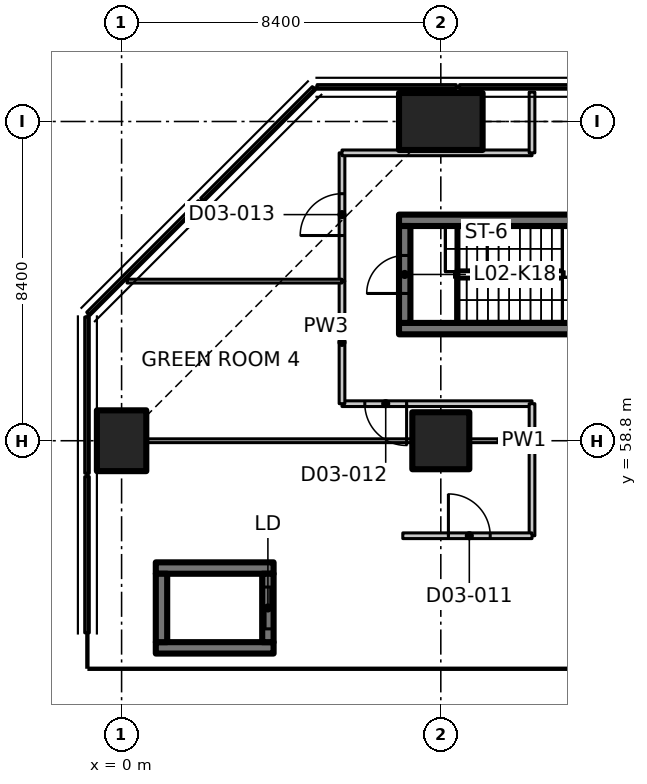
"""IFC4 building model, lengths in metres.
Left out: names, types, materials, properties, quantities, classifications, styles, units other than length and angle.
Written with IfcOpenShell. Run it as: python <this file> out.ifc"""

import sys

from ifc_helpers import new_model, si_unit, direction, frame, frame_2d, origin, origin_2d, place, context, subcontext, project, spatial, polyline, rectangle, outline, extrude, element, fill, save


model = new_model("IFC4")
c1 = context("Model", 3, precision=1e-05, world=origin(), true_north=direction((0.0, 1.0)))
c2 = subcontext(c1, "Body", "Model", "MODEL_VIEW")
j1 = project(units=[si_unit("LENGTHUNIT", "METRE"), si_unit("PLANEANGLEUNIT", "RADIAN")], contexts=[c1])
p1 = place(None, origin())
s1 = spatial("IfcSite", under=j1, at=p1, CompositionType="ELEMENT")
p2 = place(p1, origin())
s2 = spatial("IfcBuilding", under=s1, at=p2, CompositionType="ELEMENT")
p3 = place(p2, frame((0.0, 0.0, 12.5)))
s3 = spatial("IfcBuildingStorey", under=s2, at=p3, CompositionType="ELEMENT", Elevation=12.5)
p4 = place(p3, frame((0.0, 58.8, 0.0), z_axis=(0.0, 0.0, 1.0), x_axis=(1.0, 0.0, 0.0)))
e1 = element("IfcColumn", 1, at=p4, inside=s3, PredefinedType="COLUMN", context=c2, shape_type="SweptSolid", body=[
    extrude(rectangle(XDim=1.3, YDim=1.6, at=origin_2d()), origin(), (0.0, 0.0, 1.0), 7.25),
])
p5 = place(p3, frame((8.4, 58.8, 0.0), z_axis=(0.0, 0.0, 1.0), x_axis=(1.0, 0.0, 0.0)))
e2 = element("IfcColumn", 2, at=p5, inside=s3, PredefinedType="COLUMN", context=c2, shape_type="SweptSolid", body=[
    extrude(rectangle(XDim=1.5, YDim=1.5, at=origin_2d()), origin(), (0.0, 0.0, 1.0), 7.25),
])
p6 = place(p3, frame((8.4, 67.2, 0.0), z_axis=(0.0, 0.0, 1.0), x_axis=(0.0, 1.0, 0.0)))
e3 = element("IfcColumn", 3, at=p6, inside=s3, PredefinedType="COLUMN", context=c2, shape_type="SweptSolid", body=[
    extrude(rectangle(XDim=1.5, YDim=2.2, at=origin_2d()), origin(), (0.0, 0.0, 1.0), 7.25),
])
p7 = place(p2, origin())
s4 = spatial("IfcBuildingStorey", under=s2, at=p7, CompositionType="ELEMENT", Elevation=0.0)
for number, where, z_axis, x_axis in (
    (4, (0.6, 51.6, -6.3), (0.0, 0.0, 1.0), (1.0, 0.0, 0.0)),
    (5, (9.0, 51.6, -6.3), (0.0, 0.0, 1.0), (1.0, 0.0, 0.0)),
):
    element("IfcWall", number, at=place(p7, frame(where, z_axis=z_axis, x_axis=x_axis)), inside=s4, PredefinedType="SOLIDWALL", context=c2, shape_type="SweptSolid", body=[
        extrude(rectangle(XDim=7.2, YDim=2.4, at=frame_2d((3.6, 0.0))), origin(), (0.0, 0.0, 1.0), 42.55),
    ])
p8 = place(p7, frame((-1.2, 52.8, 0.0), z_axis=(0.0, 0.0, 1.0), x_axis=(0.0, 1.0, 0.0)))
e6 = element("IfcWall", 6, at=p8, inside=s4, PredefinedType="SOLIDWALL", context=c2, shape_type="SweptSolid", body=[
    extrude(rectangle(XDim=0.9, YDim=0.6, at=frame_2d((0.45, 0.0))), origin(), (0.0, 0.0, 1.0), 36.23),
])
p9 = place(p3, origin())
e7 = element("IfcWall", 7, at=p9, inside=s3, PredefinedType="SOLIDWALL", context=c2, shape_type="SweptSolid", body=[
    extrude(outline(polyline([(8.895, 68.17), (8.895, 68.05), (12.555, 68.05), (12.555, 68.17), (8.895, 68.17)])), origin(), (0.0, 0.0, 1.0), 7.5),
])
p10 = place(p3, origin())
e8 = element("IfcWall", 8, at=p10, inside=s3, PredefinedType="SOLIDWALL", context=c2, shape_type="SweptSolid", body=[
    extrude(outline(polyline([(5.145, 68.17), (5.145, 68.05), (8.805, 68.05), (8.805, 68.17), (5.145, 68.17)])), origin(), (0.0, 0.0, 1.0), 7.5),
])
p11 = place(p3, origin())
e9 = element("IfcWall", 9, at=p11, inside=s3, PredefinedType="SOLIDWALL", context=c2, shape_type="SweptSolid", body=[
    extrude(outline(polyline([(5.104, 68.033), (2.167, 65.096), (2.082, 65.181), (5.019, 68.118), (5.104, 68.033)])), origin(), (0.0, 0.0, 1.0), 7.5),
])
p12 = place(p3, origin())
e10 = element("IfcWall", 10, at=p12, inside=s3, PredefinedType="SOLIDWALL", context=c2, shape_type="SweptSolid", body=[
    extrude(outline(polyline([(2.104, 65.033), (-0.833, 62.096), (-0.918, 62.181), (2.019, 65.118), (2.104, 65.033)])), origin(), (0.0, 0.0, 1.0), 7.5),
])
p13 = place(p3, origin())
e11 = element("IfcWall", 11, at=p13, inside=s3, PredefinedType="SOLIDWALL", context=c2, shape_type="SweptSolid", body=[
    extrude(outline(polyline([(-0.97, 57.945), (-0.85, 57.945), (-0.85, 62.055), (-0.97, 62.055), (-0.97, 57.945)])), origin(), (0.0, 0.0, 1.0), 7.5),
])
p14 = place(p3, origin())
e12 = element("IfcWall", 12, at=p14, inside=s3, PredefinedType="SOLIDWALL", context=c2, shape_type="SweptSolid", body=[
    extrude(outline(polyline([(-0.97, 53.745), (-0.85, 53.745), (-0.85, 57.855), (-0.97, 57.855), (-0.97, 53.745)])), origin(), (0.0, 0.0, 1.0), 7.5),
])
for number, where, z_axis, x_axis in (
    (13, (0.9, 53.35, 0.0), (0.0, 0.0, 1.0), (1.0, 0.0, 0.0)),
    (14, (0.9, 55.45, 0.0), (0.0, 0.0, 1.0), (1.0, 0.0, 0.0)),
):
    element("IfcWall", number, at=place(p3, frame(where, z_axis=z_axis, x_axis=x_axis)), inside=s3, PredefinedType="SHEAR", context=c2, shape_type="SweptSolid", body=[
        extrude(rectangle(XDim=3.1, YDim=0.3, at=frame_2d((1.55, 0.0))), origin(), (0.0, 0.0, 1.0), 7.25),
    ])
p15 = place(p3, frame((1.05, 53.5, 0.0), z_axis=(0.0, 0.0, 1.0), x_axis=(0.0, 1.0, 0.0)))
e15 = element("IfcWall", 15, at=p15, inside=s3, PredefinedType="SHEAR", context=c2, shape_type="SweptSolid", body=[
    extrude(rectangle(XDim=1.8, YDim=0.3, at=frame_2d((0.9, 0.0))), origin(), (0.0, 0.0, 1.0), 7.25),
])
p16 = place(p3, frame((3.85, 53.5, 0.0), z_axis=(0.0, 0.0, 1.0), x_axis=(0.0, 1.0, 0.0)))
e16 = element("IfcWall", 16, at=p16, inside=s3, PredefinedType="SHEAR", context=c2, shape_type="SweptSolid", body=[
    extrude(rectangle(XDim=1.8, YDim=0.3, at=frame_2d((0.9, 0.0))), origin(), (0.0, 0.0, 1.0), 7.25),
])
p17 = place(p16, frame((0.35, 0.0, 0.0)))
e17 = element("IfcOpeningElement", 17, at=p17, cuts=e16, PredefinedType="OPENING", context=c2, shape_type="SweptSolid", body=[
    extrude(rectangle(XDim=1.1, YDim=2.3, at=frame_2d((0.55, 1.15))), frame((0.0, 0.16, 0.0), z_axis=(0.0, -1.0, 0.0), x_axis=(1.0, 0.0, 0.0)), (0.0, 0.0, 1.0), 0.32),
])
for number, where, z_axis, x_axis in (
    (18, (7.3, 61.75, 0.0), (0.0, 0.0, 1.0), (1.0, 0.0, 0.0)),
    (19, (7.3, 64.6, 0.0), (0.0, 0.0, 1.0), (1.0, 0.0, 0.0)),
):
    element("IfcWall", number, at=place(p3, frame(where, z_axis=z_axis, x_axis=x_axis)), inside=s3, PredefinedType="SHEAR", context=c2, shape_type="SweptSolid", body=[
        extrude(rectangle(XDim=8.2, YDim=0.3, at=frame_2d((4.1, 0.0))), origin(), (0.0, 0.0, 1.0), 7.25),
    ])
p18 = place(p3, frame((7.45, 61.9, 0.0), z_axis=(0.0, 0.0, 1.0), x_axis=(0.0, 1.0, 0.0)))
e20 = element("IfcWall", 20, at=p18, inside=s3, PredefinedType="SHEAR", context=c2, shape_type="SweptSolid", body=[
    extrude(rectangle(XDim=2.55, YDim=0.3, at=frame_2d((1.275, 0.0))), origin(), (0.0, 0.0, 1.0), 7.25),
])
p19 = place(p18, frame((0.775, 0.0, 0.0)))
e21 = element("IfcOpeningElement", 21, at=p19, cuts=e20, PredefinedType="OPENING", context=c2, shape_type="SweptSolid", body=[
    extrude(rectangle(XDim=1.0, YDim=2.1, at=frame_2d((0.5, 1.05))), frame((0.0, 0.16, 0.0), z_axis=(0.0, -1.0, 0.0), x_axis=(1.0, 0.0, 0.0)), (0.0, 0.0, 1.0), 0.32),
])
p20 = place(p3, frame((10.8, 56.3, 0.0), z_axis=(0.0, 0.0, 1.0), x_axis=(0.0, 1.0, 0.0)))
e22 = element("IfcWall", 22, at=p20, inside=s3, PredefinedType="PARTITIONING", context=c2, shape_type="SweptSolid", body=[
    extrude(rectangle(XDim=2.5, YDim=0.15, at=frame_2d((1.25, 0.0))), origin(), (0.0, 0.0, 1.0), 7.23),
])
p21 = place(p3, frame((10.8, 59.775, 0.0), z_axis=(0.0, 0.0, 1.0), x_axis=(-1.0, 0.0, 0.0)))
e23 = element("IfcWall", 23, at=p21, inside=s3, PredefinedType="PARTITIONING", context=c2, shape_type="SweptSolid", body=[
    extrude(rectangle(XDim=5.0, YDim=0.15, at=frame_2d((2.5, 0.0))), origin(), (0.0, 0.0, 1.0), 7.23),
])
p22 = place(p21, frame((3.3, 0.0, 0.0)))
e24 = element("IfcOpeningElement", 24, at=p22, cuts=e23, PredefinedType="OPENING", context=c2, shape_type="SweptSolid", body=[
    extrude(rectangle(XDim=1.1, YDim=2.1, at=frame_2d((0.55, 1.05))), frame((0.0, 0.085, 0.0), z_axis=(0.0, -1.0, 0.0), x_axis=(1.0, 0.0, 0.0)), (0.0, 0.0, 1.0), 0.17),
])
p23 = place(p3, frame((5.8, 59.775, 0.0), z_axis=(0.0, 0.0, 1.0), x_axis=(0.0, 1.0, 0.0)))
e25 = element("IfcWall", 25, at=p23, inside=s3, PredefinedType="PARTITIONING", context=c2, shape_type="SweptSolid", body=[
    extrude(rectangle(XDim=3.225, YDim=0.15, at=frame_2d((1.613, 0.0))), origin(), (0.0, 0.0, 1.0), 7.23),
])
p24 = place(p3, frame((5.8, 63.0, 0.0), z_axis=(0.0, 0.0, 1.0), x_axis=(0.0, 1.0, 0.0)))
e26 = element("IfcWall", 26, at=p24, inside=s3, PredefinedType="PARTITIONING", context=c2, shape_type="SweptSolid", body=[
    extrude(rectangle(XDim=3.375, YDim=0.15, at=frame_2d((1.688, 0.0))), origin(), (0.0, 0.0, 1.0), 6.88),
])
p25 = place(p24, frame((1.2, 0.0, 0.0)))
e27 = element("IfcOpeningElement", 27, at=p25, cuts=e26, PredefinedType="OPENING", context=c2, shape_type="SweptSolid", body=[
    extrude(rectangle(XDim=1.1, YDim=2.1, at=frame_2d((0.55, 1.05))), frame((0.0, 0.085, 0.0), z_axis=(0.0, -1.0, 0.0), x_axis=(1.0, 0.0, 0.0)), (0.0, 0.0, 1.0), 0.17),
])
p26 = place(p3, frame((5.8, 66.375, 0.0), z_axis=(0.0, 0.0, 1.0), x_axis=(1.0, 0.0, 0.0)))
e28 = element("IfcWall", 28, at=p26, inside=s3, PredefinedType="PARTITIONING", context=c2, shape_type="SweptSolid", body=[
    extrude(outline(polyline([(0.0, 0.0), (5.0, 0.0), (5.0, 7.23), (2.466, 7.23), (2.464, 6.88), (1.086, 6.88), (1.084, 7.23), (0.0, 7.23), (0.0, 0.0)])), frame((0.0, 0.075, 0.0), z_axis=(0.0, -1.0, 0.0), x_axis=(1.0, 0.0, 0.0)), (0.0, 0.0, 1.0), 0.15),
])
p27 = place(p3, frame((7.4, 56.3, 0.0), z_axis=(0.0, 0.0, 1.0), x_axis=(1.0, 0.0, 0.0)))
e29 = element("IfcWall", 29, at=p27, inside=s3, PredefinedType="PARTITIONING", context=c2, shape_type="SweptSolid", body=[
    extrude(rectangle(XDim=3.4, YDim=0.15, at=frame_2d((1.7, 0.0))), origin(), (0.0, 0.0, 1.0), 7.23),
])
p28 = place(p27, frame((1.2, 0.0, 0.0)))
e30 = element("IfcOpeningElement", 30, at=p28, cuts=e29, PredefinedType="OPENING", context=c2, shape_type="SweptSolid", body=[
    extrude(rectangle(XDim=1.1, YDim=2.1, at=frame_2d((0.55, 1.05))), frame((0.0, 0.085, 0.0), z_axis=(0.0, -1.0, 0.0), x_axis=(1.0, 0.0, 0.0)), (0.0, 0.0, 1.0), 0.17),
])
p29 = place(p3, frame((10.8, 66.375, 0.0), z_axis=(0.0, 0.0, 1.0), x_axis=(0.0, 1.0, 0.0)))
e31 = element("IfcWall", 31, at=p29, inside=s3, PredefinedType="PARTITIONING", context=c2, shape_type="SweptSolid", body=[
    extrude(rectangle(XDim=1.598, YDim=0.15, at=frame_2d((0.799, 0.0))), origin(), (0.0, 0.0, 1.0), 6.88),
])
p30 = place(p3, frame((0.67, 58.8, 0.0), z_axis=(0.0, 0.0, 1.0), x_axis=(1.0, 0.0, 0.0)))
e32 = element("IfcWall", 32, at=p30, inside=s3, PredefinedType="PARTITIONING", context=c2, shape_type="SweptSolid", body=[
    extrude(rectangle(XDim=6.96, YDim=0.1, at=frame_2d((3.48, 0.0))), origin(), (0.0, 0.0, 1.0), 7.23),
])
p31 = place(p3, frame((9.17, 58.8, 0.0), z_axis=(0.0, 0.0, 1.0), x_axis=(1.0, 0.0, 0.0)))
e33 = element("IfcWall", 33, at=p31, inside=s3, PredefinedType="PARTITIONING", context=c2, shape_type="SweptSolid", body=[
    extrude(rectangle(XDim=1.63, YDim=0.1, at=frame_2d((0.815, 0.0))), origin(), (0.0, 0.0, 1.0), 7.23),
])
p32 = place(p3, frame((0.144, 63.0, 0.0), z_axis=(0.0, 0.0, 1.0), x_axis=(1.0, 0.0, 0.0)))
e34 = element("IfcWall", 34, at=p32, inside=s3, PredefinedType="PARTITIONING", context=c2, shape_type="SweptSolid", body=[
    extrude(outline(polyline([(0.0, 0.0), (5.656, 0.0), (5.656, 7.23), (4.721, 7.23), (4.719, 6.88), (3.392, 6.88), (3.39, 7.23), (0.0, 7.23), (0.0, 0.0)])), frame((0.0, 0.05, 0.0), z_axis=(0.0, -1.0, 0.0), x_axis=(1.0, 0.0, 0.0)), (0.0, 0.0, 1.0), 0.1),
])
p33 = place(p3, frame((10.8, 59.775, 0.0), z_axis=(0.0, 0.0, 1.0), x_axis=(0.0, -1.0, 0.0)))
e35 = element("IfcWall", 35, at=p33, inside=s3, PredefinedType="PARTITIONING", context=c2, shape_type="SweptSolid", body=[
    extrude(rectangle(XDim=0.975, YDim=0.15, at=frame_2d((0.487, 0.0))), origin(), (0.0, 0.0, 1.0), 7.23),
])
p34 = place(p17, origin())
e36 = element("IfcDoor", 36, at=p34, inside=s3, OperationType="SLIDING_TO_LEFT", PredefinedType="DOOR", context=c2, shape_type="SweptSolid", body=[
    extrude(rectangle(XDim=1.1, YDim=2.3, at=frame_2d((0.55, 1.15))), frame((0.0, 0.025, 0.0), z_axis=(0.0, -1.0, 0.0), x_axis=(1.0, 0.0, 0.0)), (0.0, 0.0, 1.0), 0.05),
])
fill(e17, e36)
p35 = place(p19, origin())
e37 = element("IfcDoor", 37, at=p35, inside=s3, OperationType="SINGLE_SWING_RIGHT", PredefinedType="DOOR", context=c2, shape_type="SweptSolid", body=[
    extrude(rectangle(XDim=1.0, YDim=2.1, at=frame_2d((0.5, 1.05))), frame((0.0, 0.025, 0.0), z_axis=(0.0, -1.0, 0.0), x_axis=(1.0, 0.0, 0.0)), (0.0, 0.0, 1.0), 0.05),
])
fill(e21, e37)
p36 = place(p28, origin())
e38 = element("IfcDoor", 38, at=p36, inside=s3, OperationType="SINGLE_SWING_LEFT", PredefinedType="DOOR", context=c2, shape_type="SweptSolid", body=[
    extrude(rectangle(XDim=1.1, YDim=2.1, at=frame_2d((0.55, 1.05))), frame((0.0, 0.025, 0.0), z_axis=(0.0, -1.0, 0.0), x_axis=(1.0, 0.0, 0.0)), (0.0, 0.0, 1.0), 0.05),
])
fill(e30, e38)
p37 = place(p22, origin())
e39 = element("IfcDoor", 39, at=p37, inside=s3, OperationType="SINGLE_SWING_LEFT", PredefinedType="DOOR", context=c2, shape_type="SweptSolid", body=[
    extrude(rectangle(XDim=1.1, YDim=2.1, at=frame_2d((0.55, 1.05))), frame((0.0, 0.025, 0.0), z_axis=(0.0, -1.0, 0.0), x_axis=(1.0, 0.0, 0.0)), (0.0, 0.0, 1.0), 0.05),
])
fill(e24, e39)
p38 = place(p25, origin())
e40 = element("IfcDoor", 40, at=p38, inside=s3, OperationType="SINGLE_SWING_LEFT", PredefinedType="DOOR", context=c2, shape_type="SweptSolid", body=[
    extrude(rectangle(XDim=1.1, YDim=2.1, at=frame_2d((0.55, 1.05))), frame((0.0, 0.025, 0.0), z_axis=(0.0, -1.0, 0.0), x_axis=(1.0, 0.0, 0.0)), (0.0, 0.0, 1.0), 0.05),
])
fill(e27, e40)
save(model, sys.argv[1])
